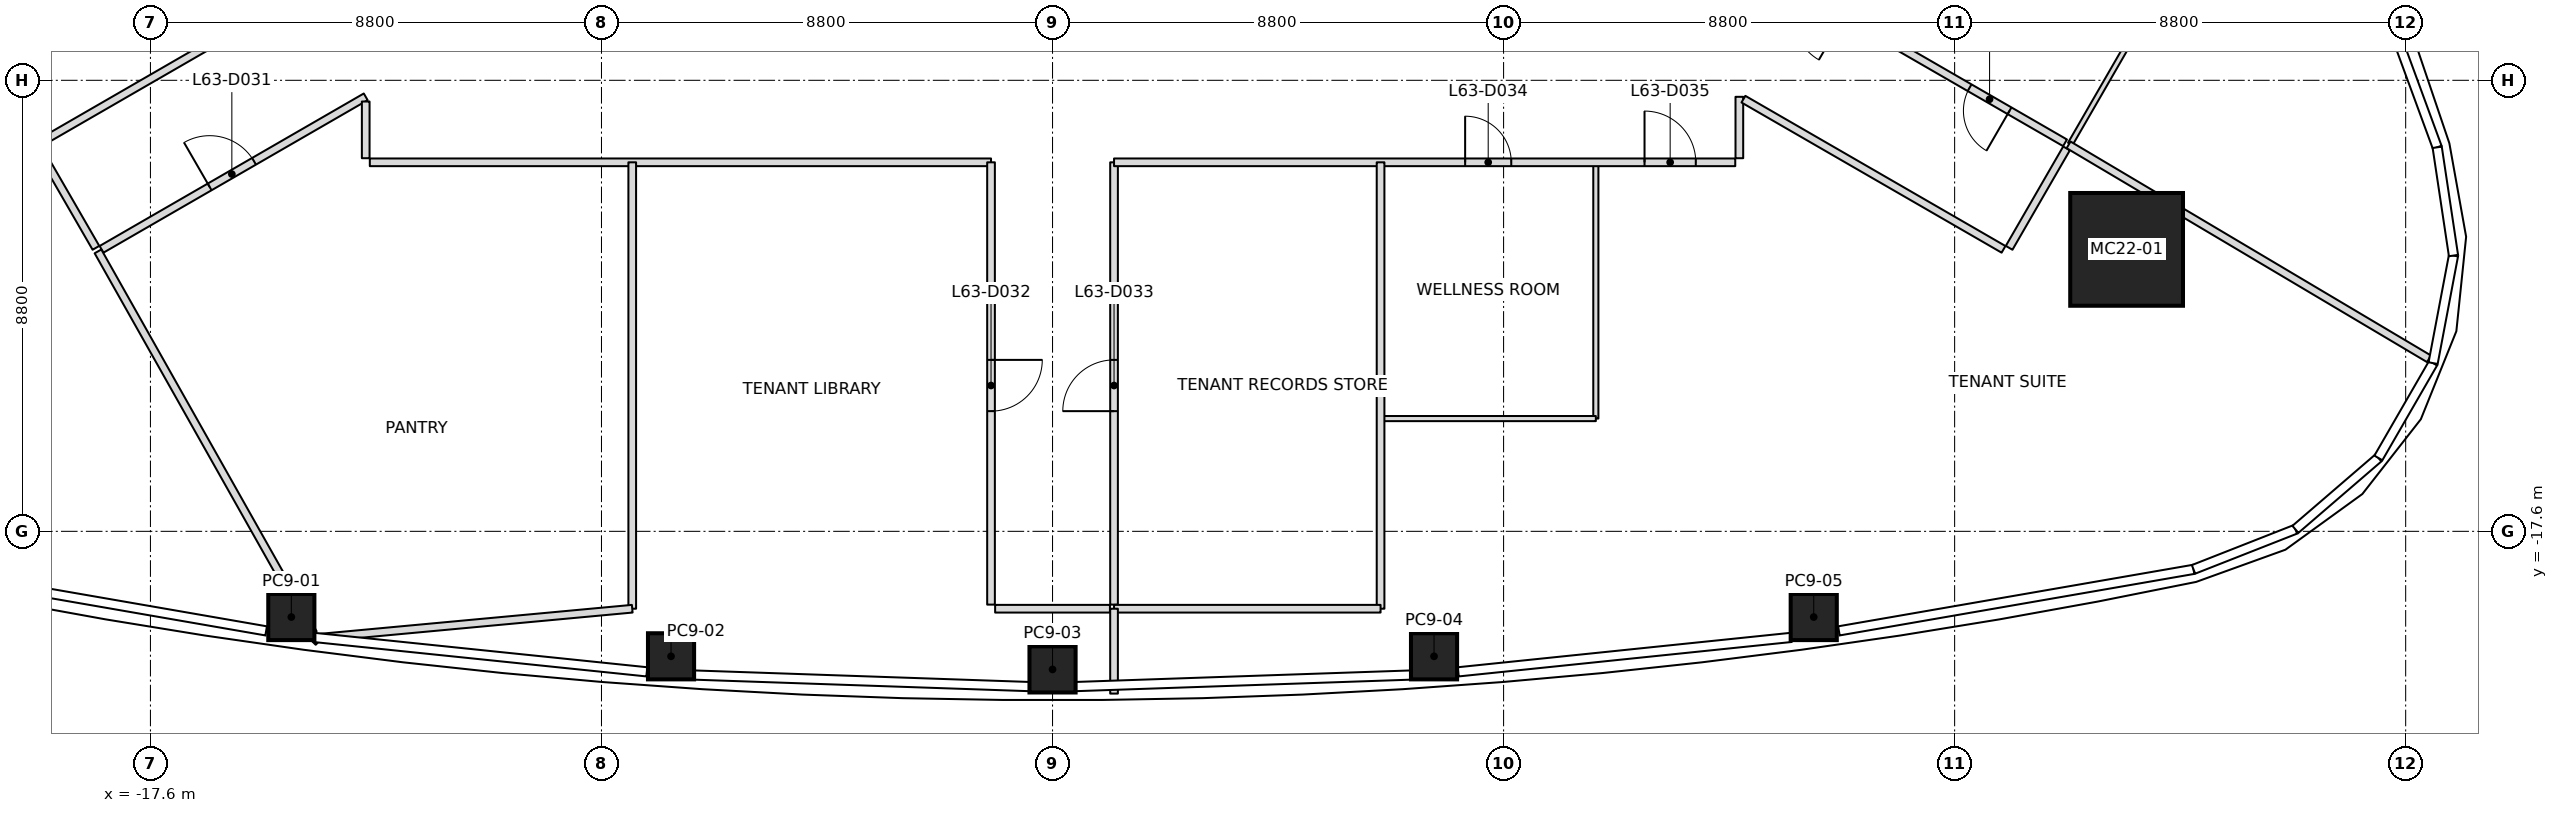
"""IFC4 building model, lengths in metres.
Left out: names, types, materials, properties, quantities, classifications, styles, units other than length and angle.
Written with IfcOpenShell. Run it as: python <this file> out.ifc"""

import sys

from ifc_helpers import new_model, si_unit, direction, frame, frame_2d, origin, origin_2d, place, context, subcontext, project, spatial, rectangle, extrude, element, fill, save


model = new_model("IFC4")
c1 = context("Model", 3, precision=1e-05, world=origin(), true_north=direction((0.0, 1.0)))
c2 = subcontext(c1, "Body", "Model", "MODEL_VIEW")
j1 = project(units=[si_unit("LENGTHUNIT", "METRE"), si_unit("PLANEANGLEUNIT", "RADIAN")], contexts=[c1])
p1 = place(None, origin())
s1 = spatial("IfcSite", under=j1, at=p1, CompositionType="ELEMENT")
p2 = place(p1, origin())
s2 = spatial("IfcBuilding", under=s1, at=p2, CompositionType="ELEMENT")
p3 = place(p2, frame((0.0, 0.0, 279.0)))
s3 = spatial("IfcBuildingStorey", under=s2, at=p3, CompositionType="ELEMENT", Elevation=279.0)
p4 = place(p3, frame((20.956, -12.099, 0.0), z_axis=(-0.027817676907, 0.016043967164, 0.999484250986), x_axis=(0.999613013546, 0.000446478676, 0.027814093645)))
e1 = element("IfcColumn", 1, at=p4, inside=s3, PredefinedType="COLUMN", context=c2, shape_type="SweptSolid", body=[
    extrude(rectangle(XDim=2.2, YDim=2.2, at=origin_2d()), origin(), (0.0, 0.0, 1.0), 4.002),
])
p5 = place(p3, frame((-14.851, -19.272, 0.0), z_axis=(0.017513460473, 0.010373826761, 0.999792809746), x_axis=(-0.990424107913, 0.137136557985, 0.01592642237)))
e2 = element("IfcColumn", 2, at=p5, inside=s3, PredefinedType="COLUMN", context=c2, shape_type="SweptSolid", body=[
    extrude(rectangle(XDim=0.9, YDim=0.9, at=origin_2d()), origin(), (0.0, 0.0, 1.0), 4.001),
])
p6 = place(p3, frame((-7.443, -20.039, 0.0), z_axis=(0.008727150594, 0.011168311599, 0.999899547784), x_axis=(-0.997603234355, 0.068736841792, 0.007939356718)))
e3 = element("IfcColumn", 3, at=p6, inside=s3, PredefinedType="COLUMN", context=c2, shape_type="SweptSolid", body=[
    extrude(rectangle(XDim=0.9, YDim=0.9, at=origin_2d()), origin(), (0.0, 0.0, 1.0), 4.0),
])
p7 = place(p3, frame((0.0, -20.294, 0.0), z_axis=(0.0, 0.01141283087, 0.999934871525), x_axis=(1.0, 0.0, 0.0)))
e4 = element("IfcColumn", 4, at=p7, inside=s3, PredefinedType="COLUMN", context=c2, shape_type="SweptSolid", body=[
    extrude(rectangle(XDim=0.9, YDim=0.9, at=origin_2d()), origin(), (0.0, 0.0, 1.0), 4.0),
])
p8 = place(p3, frame((7.443, -20.039, 0.0), z_axis=(-0.008727150594, 0.011168311599, 0.999899547784), x_axis=(0.997603234355, 0.068736841792, 0.007939356718)))
e5 = element("IfcColumn", 5, at=p8, inside=s3, PredefinedType="COLUMN", context=c2, shape_type="SweptSolid", body=[
    extrude(rectangle(XDim=0.9, YDim=0.9, at=origin_2d()), origin(), (0.0, 0.0, 1.0), 4.0),
])
p9 = place(p3, frame((14.851, -19.272, 0.0), z_axis=(-0.017513460473, 0.010373826761, 0.999792809746), x_axis=(0.990424107913, 0.137136557985, 0.01592642237)))
e6 = element("IfcColumn", 6, at=p9, inside=s3, PredefinedType="COLUMN", context=c2, shape_type="SweptSolid", body=[
    extrude(rectangle(XDim=0.9, YDim=0.9, at=origin_2d()), origin(), (0.0, 0.0, 1.0), 4.001),
])
p10 = place(p3, frame((-18.623, -12.138, 0.0), z_axis=(0.0, 0.0, 1.0), x_axis=(0.491162356309, -0.871068045416, 0.0)))
e7 = element("IfcWall", 7, at=p10, inside=s3, PredefinedType="PARTITIONING", context=c2, shape_type="SweptSolid", body=[
    extrude(rectangle(XDim=8.552, YDim=0.15, at=frame_2d((4.276, 0.0))), origin(), (0.0, 0.0, 1.0), 3.45),
])
p11 = place(p3, frame((-8.2, -10.4, 0.0), z_axis=(0.0, 0.0, 1.0), x_axis=(0.0, -1.0, 0.0)))
e8 = element("IfcWall", 8, at=p11, inside=s3, PredefinedType="PARTITIONING", context=c2, shape_type="SweptSolid", body=[
    extrude(rectangle(XDim=8.71, YDim=0.15, at=frame_2d((4.355, 0.0))), origin(), (0.0, 0.0, 1.0), 3.45),
])
p12 = place(p3, frame((-8.2, -19.11, 0.0), z_axis=(0.0, 0.0, 1.0), x_axis=(-0.995719825194, -0.092423101639, 0.0)))
e9 = element("IfcWall", 9, at=p12, inside=s3, PredefinedType="PARTITIONING", context=c2, shape_type="SweptSolid", body=[
    extrude(rectangle(XDim=6.099, YDim=0.15, at=frame_2d((3.05, 0.0))), origin(), (0.0, 0.0, 1.0), 3.234),
])
p13 = place(p3, frame((-14.323, -19.76, 0.0), z_axis=(0.0, 0.0, 1.0), x_axis=(-0.709632138317, 0.704572372625, 0.0)))
e10 = element("IfcWall", 10, at=p13, inside=s3, PredefinedType="PARTITIONING", context=c2, shape_type="SweptSolid", body=[
    extrude(rectangle(XDim=0.193, YDim=0.15, at=frame_2d((0.097, 0.0))), origin(), (0.0, 0.0, 1.0), 3.45),
])
p14 = place(p3, frame((6.4, -10.4, 0.0), z_axis=(0.0, 0.0, 1.0), x_axis=(0.0, -1.0, 0.0)))
e11 = element("IfcWall", 11, at=p14, inside=s3, PredefinedType="PARTITIONING", context=c2, shape_type="SweptSolid", body=[
    extrude(rectangle(XDim=8.71, YDim=0.15, at=frame_2d((4.355, 0.0))), origin(), (0.0, 0.0, 1.0), 3.45),
])
p15 = place(p3, frame((6.4, -19.11, 0.0), z_axis=(0.0, 0.0, 1.0), x_axis=(-1.0, 0.0, 0.0)))
e12 = element("IfcWall", 12, at=p15, inside=s3, PredefinedType="PARTITIONING", context=c2, shape_type="SweptSolid", body=[
    extrude(rectangle(XDim=5.2, YDim=0.15, at=frame_2d((2.6, 0.0))), origin(), (0.0, 0.0, 1.0), 3.317),
])
p16 = place(p3, frame((1.2, -19.11, 0.0), z_axis=(0.0, 0.0, 1.0), x_axis=(0.0, -1.0, 0.0)))
e13 = element("IfcWall", 13, at=p16, inside=s3, PredefinedType="PARTITIONING", context=c2, shape_type="SweptSolid", body=[
    extrude(rectangle(XDim=1.656, YDim=0.15, at=frame_2d((0.828, 0.0))), origin(), (0.0, 0.0, 1.0), 3.234),
])
p17 = place(p3, frame((19.823, -10.059, 0.0), z_axis=(0.0, 0.0, 1.0), x_axis=(0.8599042964, -0.510455287986, 0.0)))
e14 = element("IfcWall", 14, at=p17, inside=s3, PredefinedType="PARTITIONING", context=c2, shape_type="SweptSolid", body=[
    extrude(rectangle(XDim=8.178, YDim=0.15, at=frame_2d((4.089, 0.0))), origin(), (0.0, 0.0, 1.0), 3.234),
])
p18 = place(p3, frame((-19.783, -10.129, 0.0), z_axis=(0.0, 0.0, 1.0), x_axis=(0.500030632641, -0.866007717299, 0.0)))
e15 = element("IfcWall", 15, at=p18, inside=s3, PredefinedType="PARTITIONING", context=c2, shape_type="SweptSolid", body=[
    extrude(rectangle(XDim=2.24, YDim=0.15, at=frame_2d((1.12, 0.0))), origin(), (0.0, 0.0, 1.0), 3.233),
])
p19 = place(p3, frame((-13.4, -6.351, 0.0), z_axis=(0.0, 0.0, 1.0), x_axis=(-0.866035423939, -0.499982644181, 0.0)))
e16 = element("IfcWall", 16, at=p19, inside=s3, PredefinedType="PARTITIONING", context=c2, shape_type="SweptSolid", body=[
    extrude(rectangle(XDim=7.337, YDim=0.15, at=frame_2d((3.668, 0.0))), origin(), (0.0, 0.0, 1.0), 3.317),
])
p20 = place(p3, frame((-18.554, -12.098, 0.0), z_axis=(0.0, 0.0, 1.0), x_axis=(0.866025739194, 0.499999419053, 0.0)))
e17 = element("IfcWall", 17, at=p20, inside=s3, PredefinedType="PARTITIONING", context=c2, shape_type="SweptSolid", body=[
    extrude(rectangle(XDim=5.952, YDim=0.15, at=frame_2d((2.976, 0.0))), origin(), (0.0, 0.0, 1.0), 3.233),
])
p21 = place(p20, frame((2.436, 0.0, 0.0)))
e18 = element("IfcOpeningElement", 18, at=p21, cuts=e17, PredefinedType="OPENING", context=c2, shape_type="SweptSolid", body=[
    extrude(rectangle(XDim=1.0, YDim=2.1, at=frame_2d((0.5, 1.05))), frame((0.0, 0.075, 0.0), z_axis=(0.0, -1.0, 0.0), x_axis=(1.0, 0.0, 0.0)), (0.0, 0.0, 1.0), 0.15),
])
p22 = place(p3, frame((-13.4, -9.214, 0.0), z_axis=(0.0, 0.0, 1.0), x_axis=(0.0, -1.0, 0.0)))
e19 = element("IfcWall", 19, at=p22, inside=s3, PredefinedType="PARTITIONING", context=c2, shape_type="SweptSolid", body=[
    extrude(rectangle(XDim=1.106, YDim=0.15, at=frame_2d((0.553, 0.0))), origin(), (0.0, 0.0, 1.0), 3.233),
])
p23 = place(p3, frame((-13.32, -10.4, 0.0), z_axis=(0.0, 0.0, 1.0), x_axis=(1.0, 0.0, 0.0)))
e20 = element("IfcWall", 20, at=p23, inside=s3, PredefinedType="PARTITIONING", context=c2, shape_type="SweptSolid", body=[
    extrude(rectangle(XDim=12.12, YDim=0.15, at=frame_2d((6.06, 0.0))), origin(), (0.0, 0.0, 1.0), 3.317),
])
p24 = place(p3, frame((-1.2, -10.4, 0.0), z_axis=(0.0, 0.0, 1.0), x_axis=(0.0, -1.0, 0.0)))
e21 = element("IfcWall", 21, at=p24, inside=s3, PredefinedType="PARTITIONING", context=c2, shape_type="SweptSolid", body=[
    extrude(rectangle(XDim=8.63, YDim=0.15, at=frame_2d((4.315, 0.0))), origin(), (0.0, 0.0, 1.0), 3.45),
])
p25 = place(p24, frame((3.855, 0.0, 0.0)))
e22 = element("IfcOpeningElement", 22, at=p25, cuts=e21, PredefinedType="OPENING", context=c2, shape_type="SweptSolid", body=[
    extrude(rectangle(XDim=1.0, YDim=2.1, at=frame_2d((0.5, 1.05))), frame((0.0, 0.075, 0.0), z_axis=(0.0, -1.0, 0.0), x_axis=(1.0, 0.0, 0.0)), (0.0, 0.0, 1.0), 0.15),
])
p26 = place(p3, frame((-1.12, -19.11, 0.0), z_axis=(0.0, 0.0, 1.0), x_axis=(1.0, 0.0, 0.0)))
e23 = element("IfcWall", 23, at=p26, inside=s3, PredefinedType="PARTITIONING", context=c2, shape_type="SweptSolid", body=[
    extrude(rectangle(XDim=2.24, YDim=0.15, at=frame_2d((1.12, 0.0))), origin(), (0.0, 0.0, 1.0), 3.45),
])
p27 = place(p3, frame((1.2, -19.03, 0.0), z_axis=(0.0, 0.0, 1.0), x_axis=(0.0, 1.0, 0.0)))
e24 = element("IfcWall", 24, at=p27, inside=s3, PredefinedType="PARTITIONING", context=c2, shape_type="SweptSolid", body=[
    extrude(rectangle(XDim=8.63, YDim=0.15, at=frame_2d((4.315, 0.0))), origin(), (0.0, 0.0, 1.0), 3.45),
])
p28 = place(p27, frame((3.775, 0.0, 0.0)))
e25 = element("IfcOpeningElement", 25, at=p28, cuts=e24, PredefinedType="OPENING", context=c2, shape_type="SweptSolid", body=[
    extrude(rectangle(XDim=1.0, YDim=2.1, at=frame_2d((0.5, 1.05))), frame((0.0, 0.075, 0.0), z_axis=(0.0, -1.0, 0.0), x_axis=(1.0, 0.0, 0.0)), (0.0, 0.0, 1.0), 0.15),
])
p29 = place(p3, frame((1.2, -10.4, 0.0), z_axis=(0.0, 0.0, 1.0), x_axis=(1.0, 0.0, 0.0)))
e26 = element("IfcWall", 26, at=p29, inside=s3, PredefinedType="PARTITIONING", context=c2, shape_type="SweptSolid", body=[
    extrude(rectangle(XDim=12.12, YDim=0.15, at=frame_2d((6.06, 0.0))), origin(), (0.0, 0.0, 1.0), 3.317),
])
p30 = place(p29, frame((6.85, 0.0, 0.0)))
e27 = element("IfcOpeningElement", 27, at=p30, cuts=e26, PredefinedType="OPENING", context=c2, shape_type="SweptSolid", body=[
    extrude(rectangle(XDim=0.9, YDim=2.1, at=frame_2d((0.45, 1.05))), frame((0.0, 0.075, 0.0), z_axis=(0.0, -1.0, 0.0), x_axis=(1.0, 0.0, 0.0)), (0.0, 0.0, 1.0), 0.15),
])
p31 = place(p29, frame((10.35, 0.0, 0.0)))
e28 = element("IfcOpeningElement", 28, at=p31, cuts=e26, PredefinedType="OPENING", context=c2, shape_type="SweptSolid", body=[
    extrude(rectangle(XDim=1.0, YDim=2.1, at=frame_2d((0.5, 1.05))), frame((0.0, 0.075, 0.0), z_axis=(0.0, -1.0, 0.0), x_axis=(1.0, 0.0, 0.0)), (0.0, 0.0, 1.0), 0.15),
])
p32 = place(p3, frame((13.4, -10.32, 0.0), z_axis=(0.0, 0.0, 1.0), x_axis=(0.0, 1.0, 0.0)))
e29 = element("IfcWall", 29, at=p32, inside=s3, PredefinedType="PARTITIONING", context=c2, shape_type="SweptSolid", body=[
    extrude(rectangle(XDim=1.198, YDim=0.15, at=frame_2d((0.599, 0.0))), origin(), (0.0, 0.0, 1.0), 3.233),
])
p33 = place(p3, frame((13.479, -9.168, 0.0), z_axis=(0.0, 0.0, 1.0), x_axis=(0.866032259827, -0.499988124798, 0.0)))
e30 = element("IfcWall", 30, at=p33, inside=s3, PredefinedType="PARTITIONING", context=c2, shape_type="SweptSolid", body=[
    extrude(rectangle(XDim=5.86, YDim=0.15, at=frame_2d((2.93, 0.0))), origin(), (0.0, 0.0, 1.0), 3.233),
])
p34 = place(p3, frame((19.754, -10.019, 0.0), z_axis=(0.0, 0.0, 1.0), x_axis=(-0.866035423939, 0.499982644181, 0.0)))
e31 = element("IfcWall", 31, at=p34, inside=s3, PredefinedType="PARTITIONING", context=c2, shape_type="SweptSolid", body=[
    extrude(rectangle(XDim=7.337, YDim=0.15, at=frame_2d((3.668, 0.0))), origin(), (0.0, 0.0, 1.0), 3.317),
])
p35 = place(p34, frame((1.25, 0.0, 0.0)))
e32 = element("IfcOpeningElement", 32, at=p35, cuts=e31, PredefinedType="OPENING", context=c2, shape_type="SweptSolid", body=[
    extrude(rectangle(XDim=0.9, YDim=2.1, at=frame_2d((0.45, 1.05))), frame((0.0, 0.075, 0.0), z_axis=(0.0, -1.0, 0.0), x_axis=(1.0, 0.0, 0.0)), (0.0, 0.0, 1.0), 0.15),
])
p36 = place(p34, frame((4.969, 0.0, 0.0)))
e33 = element("IfcOpeningElement", 33, at=p36, cuts=e31, PredefinedType="OPENING", context=c2, shape_type="SweptSolid", body=[
    extrude(rectangle(XDim=1.0, YDim=2.1, at=frame_2d((0.5, 1.05))), frame((0.0, 0.075, 0.0), z_axis=(0.0, -1.0, 0.0), x_axis=(1.0, 0.0, 0.0)), (0.0, 0.0, 1.0), 0.15),
])
p37 = place(p3, frame((18.663, -12.069, 0.0), z_axis=(0.0, 0.0, 1.0), x_axis=(0.500030632641, 0.866007717299, 0.0)))
e34 = element("IfcWall", 34, at=p37, inside=s3, PredefinedType="PARTITIONING", context=c2, shape_type="SweptSolid", body=[
    extrude(rectangle(XDim=2.24, YDim=0.15, at=frame_2d((1.12, 0.0))), origin(), (0.0, 0.0, 1.0), 3.233),
])
p38 = place(p3, frame((10.6, -10.43, 0.0), z_axis=(0.0, 0.0, 1.0), x_axis=(0.0, -1.0, 0.0)))
e35 = element("IfcWall", 35, at=p38, inside=s3, PredefinedType="PARTITIONING", context=c2, shape_type="SweptSolid", body=[
    extrude(rectangle(XDim=4.97, YDim=0.1, at=frame_2d((2.485, 0.0))), origin(), (0.0, 0.0, 1.0), 3.45),
])
p39 = place(p3, frame((10.6, -15.4, 0.0), z_axis=(0.0, 0.0, 1.0), x_axis=(-1.0, 0.0, 0.0)))
e36 = element("IfcWall", 36, at=p39, inside=s3, PredefinedType="PARTITIONING", context=c2, shape_type="SweptSolid", body=[
    extrude(rectangle(XDim=4.17, YDim=0.1, at=frame_2d((2.085, 0.0))), origin(), (0.0, 0.0, 1.0), 3.393),
])
for number, where, z_axis, x_axis in (
    (37, (16.738, -8.243, 0.0), (0.0, 0.0, 1.0), (0.5, 0.866, 0.0)),
    (38, (21.941, -6.432, 0.0), (0.0, 0.0, 1.0), (-0.5, -0.866, 0.0)),
):
    element("IfcWall", number, at=place(p3, frame(where, z_axis=z_axis, x_axis=x_axis)), inside=s3, PredefinedType="PARTITIONING", context=c2, shape_type="SweptSolid", body=[
        extrude(rectangle(XDim=4.17, YDim=0.1, at=frame_2d((2.085, 0.0))), origin(), (0.0, 0.0, 1.0), 3.45),
    ])
p40 = place(p21, origin())
e39 = element("IfcDoor", 39, at=p40, inside=s3, OperationType="SINGLE_SWING_LEFT", PredefinedType="DOOR", context=c2, shape_type="SweptSolid", body=[
    extrude(rectangle(XDim=1.0, YDim=2.1, at=frame_2d((0.5, 1.05))), frame((0.0, 0.025, 0.0), z_axis=(0.0, -1.0, 0.0), x_axis=(1.0, 0.0, 0.0)), (0.0, 0.0, 1.0), 0.05),
])
fill(e18, e39)
p41 = place(p25, origin())
e40 = element("IfcDoor", 40, at=p41, inside=s3, OperationType="SINGLE_SWING_RIGHT", PredefinedType="DOOR", context=c2, shape_type="SweptSolid", body=[
    extrude(rectangle(XDim=1.0, YDim=2.1, at=frame_2d((0.5, 1.05))), frame((0.0, 0.025, 0.0), z_axis=(0.0, -1.0, 0.0), x_axis=(1.0, 0.0, 0.0)), (0.0, 0.0, 1.0), 0.05),
])
fill(e22, e40)
p42 = place(p28, origin())
e41 = element("IfcDoor", 41, at=p42, inside=s3, OperationType="SINGLE_SWING_LEFT", PredefinedType="DOOR", context=c2, shape_type="SweptSolid", body=[
    extrude(rectangle(XDim=1.0, YDim=2.1, at=frame_2d((0.5, 1.05))), frame((0.0, 0.025, 0.0), z_axis=(0.0, -1.0, 0.0), x_axis=(1.0, 0.0, 0.0)), (0.0, 0.0, 1.0), 0.05),
])
fill(e25, e41)
p43 = place(p30, origin())
e42 = element("IfcDoor", 42, at=p43, inside=s3, OperationType="SINGLE_SWING_RIGHT", PredefinedType="DOOR", context=c2, shape_type="SweptSolid", body=[
    extrude(rectangle(XDim=0.9, YDim=2.1, at=frame_2d((0.45, 1.05))), frame((0.0, 0.025, 0.0), z_axis=(0.0, -1.0, 0.0), x_axis=(1.0, 0.0, 0.0)), (0.0, 0.0, 1.0), 0.05),
])
fill(e27, e42)
p44 = place(p31, origin())
e43 = element("IfcDoor", 43, at=p44, inside=s3, OperationType="SINGLE_SWING_RIGHT", PredefinedType="DOOR", context=c2, shape_type="SweptSolid", body=[
    extrude(rectangle(XDim=1.0, YDim=2.1, at=frame_2d((0.5, 1.05))), frame((0.0, 0.025, 0.0), z_axis=(0.0, -1.0, 0.0), x_axis=(1.0, 0.0, 0.0)), (0.0, 0.0, 1.0), 0.05),
])
fill(e28, e43)
p45 = place(p35, origin())
e44 = element("IfcDoor", 44, at=p45, inside=s3, OperationType="SINGLE_SWING_LEFT", PredefinedType="DOOR", context=c2, shape_type="SweptSolid", body=[
    extrude(rectangle(XDim=0.9, YDim=2.1, at=frame_2d((0.45, 1.05))), frame((0.0, 0.025, 0.0), z_axis=(0.0, -1.0, 0.0), x_axis=(1.0, 0.0, 0.0)), (0.0, 0.0, 1.0), 0.05),
])
fill(e32, e44)
save(model, sys.argv[1])
